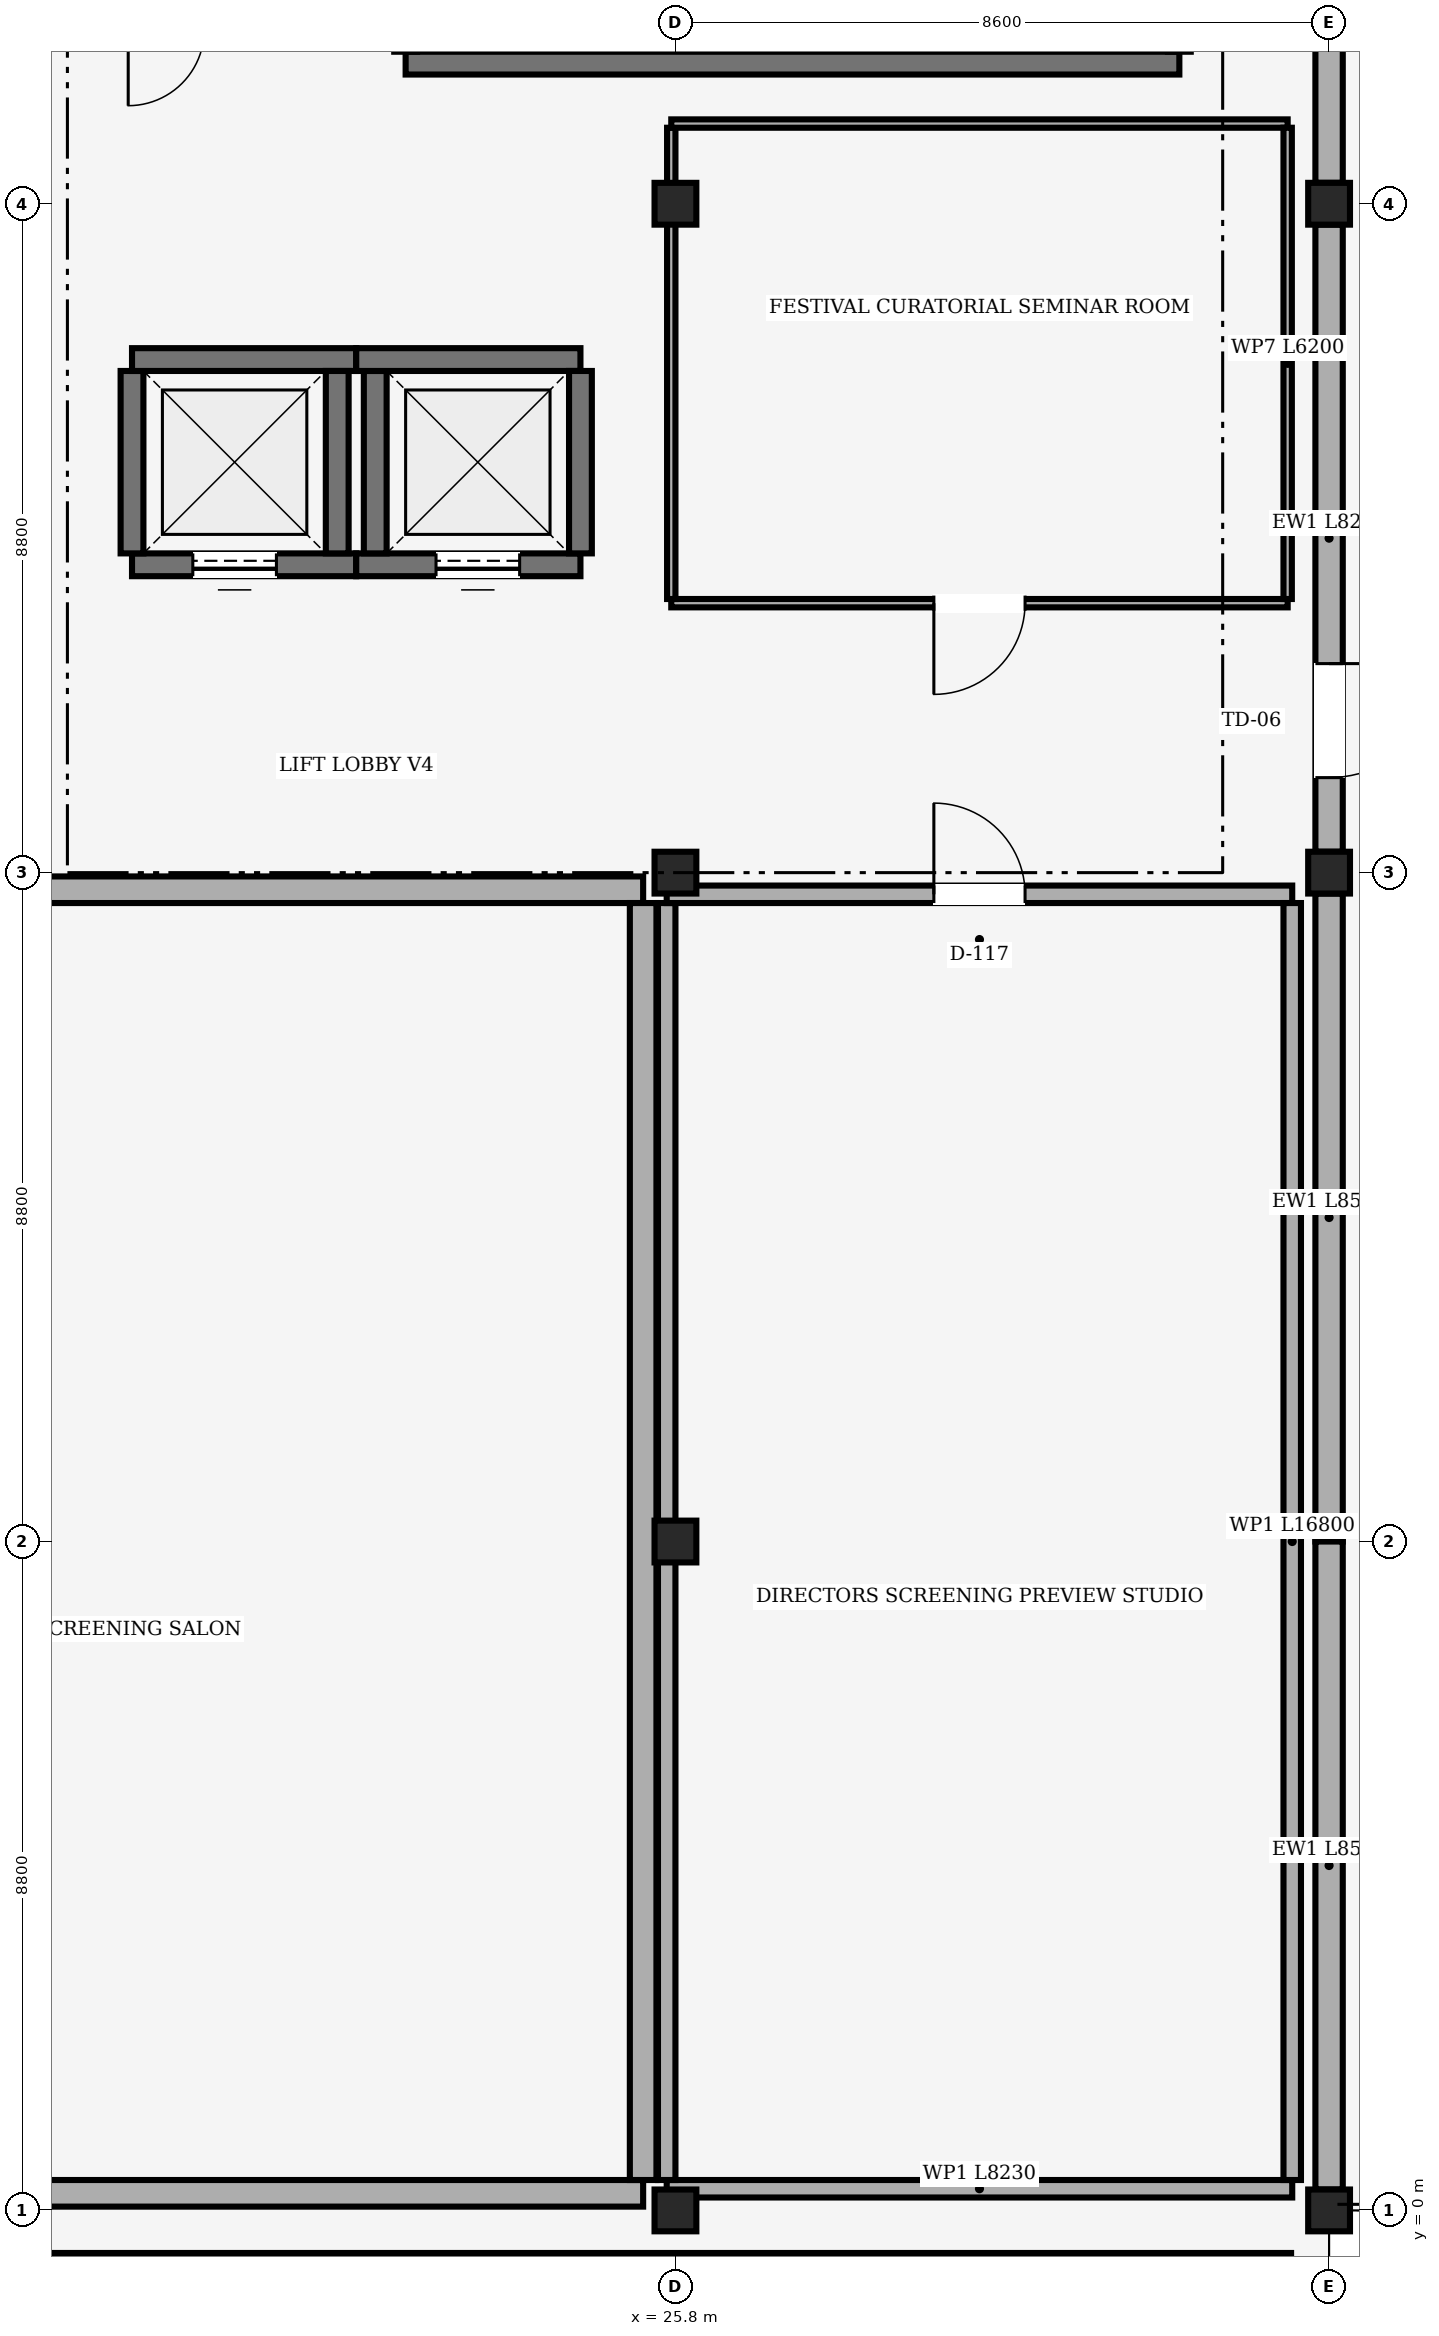
"""IFC4 building model, lengths in metres.
Left out: names, types, materials, properties, quantities, classifications, styles, units other than length and angle.
Written with IfcOpenShell. Run it as: python <this file> out.ifc"""

import sys

from ifc_helpers import new_model, si_unit, direction, frame, frame_2d, origin, origin_2d, place, context, subcontext, project, spatial, rectangle, extrude, element, fill, save


model = new_model("IFC4")
c1 = context("Model", 3, precision=1e-05, world=origin(), true_north=direction((0.0, 1.0)))
c2 = subcontext(c1, "Body", "Model", "MODEL_VIEW")
j1 = project(units=[si_unit("LENGTHUNIT", "METRE"), si_unit("PLANEANGLEUNIT", "RADIAN")], contexts=[c1])
p1 = place(None, origin())
s1 = spatial("IfcSite", under=j1, at=p1, CompositionType="ELEMENT")
p2 = place(p1, origin())
s2 = spatial("IfcBuilding", under=s1, at=p2, CompositionType="ELEMENT")
p3 = place(p2, frame((0.0, 0.0, 25.5)))
s3 = spatial("IfcBuildingStorey", under=s2, at=p3, CompositionType="ELEMENT", Elevation=25.5)
for number, where, z_axis, x_axis in (
    (1, (25.8, 0.0, 0.0), (0.0, 0.0, 1.0), (1.0, 0.0, 0.0)),
    (2, (25.8, 8.8, 0.0), (0.0, 0.0, 1.0), (1.0, 0.0, 0.0)),
    (3, (25.8, 17.6, 0.0), (0.0, 0.0, 1.0), (1.0, 0.0, 0.0)),
    (4, (25.8, 26.4, 0.0), (0.0, 0.0, 1.0), (1.0, 0.0, 0.0)),
    (5, (34.4, 0.0, 0.0), (0.0, 0.0, 1.0), (1.0, 0.0, 0.0)),
    (6, (34.4, 17.6, 0.0), (0.0, 0.0, 1.0), (1.0, 0.0, 0.0)),
    (7, (34.4, 26.4, 0.0), (0.0, 0.0, 1.0), (1.0, 0.0, 0.0)),
):
    element("IfcColumn", number, at=place(p3, frame(where, z_axis=z_axis, x_axis=x_axis)), inside=s3, PredefinedType="COLUMN", context=c2, shape_type="SweptSolid", body=[
        extrude(rectangle(XDim=0.55, YDim=0.55, at=origin_2d()), origin(), (0.0, 0.0, 1.0), 2.91),
    ])
p4 = place(p3, frame((33.9, -0.74, 0.0), z_axis=(0.0, 0.0, 1.0), x_axis=(-1.0, 0.0, 0.0)))
e8 = element("IfcWall", 8, at=p4, inside=s3, PredefinedType="SOLIDWALL", context=c2, shape_type="SweptSolid", body=[
    extrude(rectangle(XDim=34.64, YDim=0.36, at=frame_2d((17.32, 0.0))), origin(), (0.0, 0.0, 1.0), 2.91),
])
p5 = place(p4, frame((16.28, 0.0, 0.36)))
e9 = element("IfcOpeningElement", 9, at=p5, cuts=e8, PredefinedType="OPENING", context=c2, shape_type="SweptSolid", body=[
    extrude(rectangle(XDim=0.28, YDim=0.28, at=frame_2d((0.14, 0.14))), frame((0.0, 0.18, 0.0), z_axis=(0.0, -1.0, 0.0), x_axis=(1.0, 0.0, 0.0)), (0.0, 0.0, 1.0), 0.36),
])
p6 = place(p4, frame((17.18, 0.0, 0.36)))
e10 = element("IfcOpeningElement", 10, at=p6, cuts=e8, PredefinedType="OPENING", context=c2, shape_type="SweptSolid", body=[
    extrude(rectangle(XDim=0.28, YDim=0.28, at=frame_2d((0.14, 0.14))), frame((0.0, 0.18, 0.0), z_axis=(0.0, -1.0, 0.0), x_axis=(1.0, 0.0, 0.0)), (0.0, 0.0, 1.0), 0.36),
])
p7 = place(p4, frame((19.88, 0.0, 0.36)))
e11 = element("IfcOpeningElement", 11, at=p7, cuts=e8, PredefinedType="OPENING", context=c2, shape_type="SweptSolid", body=[
    extrude(rectangle(XDim=0.28, YDim=0.28, at=frame_2d((0.14, 0.14))), frame((0.0, 0.18, 0.0), z_axis=(0.0, -1.0, 0.0), x_axis=(1.0, 0.0, 0.0)), (0.0, 0.0, 1.0), 0.36),
])
p8 = place(p3, frame((34.4, 34.925, 0.0), z_axis=(0.0, 0.0, 1.0), x_axis=(0.0, -1.0, 0.0)))
e12 = element("IfcWall", 12, at=p8, inside=s3, PredefinedType="SOLIDWALL", context=c2, shape_type="SweptSolid", body=[
    extrude(rectangle(XDim=8.25, YDim=0.36, at=frame_2d((4.125, 0.0))), origin(), (0.0, 0.0, 1.0), 2.345),
])
p9 = place(p3, frame((34.4, 26.125, 0.0), z_axis=(0.0, 0.0, 1.0), x_axis=(0.0, -1.0, 0.0)))
e13 = element("IfcWall", 13, at=p9, inside=s3, PredefinedType="SOLIDWALL", context=c2, shape_type="SweptSolid", body=[
    extrude(rectangle(XDim=8.25, YDim=0.36, at=frame_2d((4.125, 0.0))), origin(), (0.0, 0.0, 1.0), 2.345),
])
p10 = place(p9, frame((5.775, 0.0, 0.0)))
e14 = element("IfcOpeningElement", 14, at=p10, cuts=e13, PredefinedType="OPENING", context=c2, shape_type="SweptSolid", body=[
    extrude(rectangle(XDim=1.5, YDim=2.15, at=frame_2d((0.75, 1.075))), frame((0.0, 0.18, 0.0), z_axis=(0.0, -1.0, 0.0), x_axis=(1.0, 0.0, 0.0)), (0.0, 0.0, 1.0), 0.36),
])
p11 = place(p3, frame((34.4, 17.325, 0.0), z_axis=(0.0, 0.0, 1.0), x_axis=(0.0, -1.0, 0.0)))
e15 = element("IfcWall", 15, at=p11, inside=s3, PredefinedType="SOLIDWALL", context=c2, shape_type="SweptSolid", body=[
    extrude(rectangle(XDim=8.525, YDim=0.36, at=frame_2d((4.262, 0.0))), origin(), (0.0, 0.0, 1.0), 2.345),
])
p12 = place(p3, frame((34.4, 8.8, 0.0), z_axis=(0.0, 0.0, 1.0), x_axis=(0.0, -1.0, 0.0)))
e16 = element("IfcWall", 16, at=p12, inside=s3, PredefinedType="SOLIDWALL", context=c2, shape_type="SweptSolid", body=[
    extrude(rectangle(XDim=8.525, YDim=0.36, at=frame_2d((4.263, 0.0))), origin(), (0.0, 0.0, 1.0), 2.345),
])
p13 = place(p3, frame((32.43, 28.25, 0.0), z_axis=(0.0, 0.0, 1.0), x_axis=(-1.0, 0.0, 0.0)))
e17 = element("IfcWall", 17, at=p13, inside=s3, PredefinedType="SHEAR", context=c2, shape_type="SweptSolid", body=[
    extrude(rectangle(XDim=10.18, YDim=0.3, at=frame_2d((5.09, 0.0))), origin(), (0.0, 0.0, 1.0), 2.91),
])
p14 = place(p3, frame((32.43, 32.55, 0.0), z_axis=(0.0, 0.0, 1.0), x_axis=(0.0, -1.0, 0.0)))
e18 = element("IfcWall", 18, at=p14, inside=s3, PredefinedType="SHEAR", context=c2, shape_type="SweptSolid", body=[
    extrude(rectangle(XDim=4.15, YDim=0.3, at=frame_2d((2.075, 0.0))), origin(), (0.0, 0.0, 1.0), 2.91),
])
p15 = place(p3, frame((21.6, 21.65, 0.0), z_axis=(0.0, 0.0, 1.0), x_axis=(-1.0, 0.0, 0.0)))
e19 = element("IfcWall", 19, at=p15, inside=s3, PredefinedType="SHEAR", context=c2, shape_type="SweptSolid", body=[
    extrude(rectangle(XDim=2.95, YDim=0.3, at=frame_2d((1.475, 0.0))), origin(), (0.0, 0.0, 1.0), 2.91),
])
p16 = place(p15, frame((1.05, 0.0, 0.0)))
e20 = element("IfcOpeningElement", 20, at=p16, cuts=e19, PredefinedType="OPENING", context=c2, shape_type="SweptSolid", body=[
    extrude(rectangle(XDim=1.1, YDim=2.1, at=frame_2d((0.55, 1.05))), frame((0.0, 0.15, 0.0), z_axis=(0.0, -1.0, 0.0), x_axis=(1.0, 0.0, 0.0)), (0.0, 0.0, 1.0), 0.3),
])
p17 = place(p3, frame((18.65, 21.8, 0.0), z_axis=(0.0, 0.0, 1.0), x_axis=(0.0, 1.0, 0.0)))
e21 = element("IfcWall", 21, at=p17, inside=s3, PredefinedType="SHEAR", context=c2, shape_type="SweptSolid", body=[
    extrude(rectangle(XDim=2.4, YDim=0.3, at=frame_2d((1.2, 0.0))), origin(), (0.0, 0.0, 1.0), 2.91),
])
p18 = place(p3, frame((18.65, 24.35, 0.0), z_axis=(0.0, 0.0, 1.0), x_axis=(1.0, 0.0, 0.0)))
e22 = element("IfcWall", 22, at=p18, inside=s3, PredefinedType="SHEAR", context=c2, shape_type="SweptSolid", body=[
    extrude(rectangle(XDim=2.95, YDim=0.3, at=frame_2d((1.475, 0.0))), origin(), (0.0, 0.0, 1.0), 2.91),
])
p19 = place(p3, frame((21.35, 24.2, 0.0), z_axis=(0.0, 0.0, 1.0), x_axis=(0.0, -1.0, 0.0)))
e23 = element("IfcWall", 23, at=p19, inside=s3, PredefinedType="SHEAR", context=c2, shape_type="SweptSolid", body=[
    extrude(rectangle(XDim=2.4, YDim=0.3, at=frame_2d((1.2, 0.0))), origin(), (0.0, 0.0, 1.0), 2.91),
])
p20 = place(p3, frame((24.55, 21.65, 0.0), z_axis=(0.0, 0.0, 1.0), x_axis=(-1.0, 0.0, 0.0)))
e24 = element("IfcWall", 24, at=p20, inside=s3, PredefinedType="SHEAR", context=c2, shape_type="SweptSolid", body=[
    extrude(rectangle(XDim=2.95, YDim=0.3, at=frame_2d((1.475, 0.0))), origin(), (0.0, 0.0, 1.0), 2.91),
])
p21 = place(p20, frame((0.8, 0.0, 0.0)))
e25 = element("IfcOpeningElement", 25, at=p21, cuts=e24, PredefinedType="OPENING", context=c2, shape_type="SweptSolid", body=[
    extrude(rectangle(XDim=1.1, YDim=2.1, at=frame_2d((0.55, 1.05))), frame((0.0, 0.15, 0.0), z_axis=(0.0, -1.0, 0.0), x_axis=(1.0, 0.0, 0.0)), (0.0, 0.0, 1.0), 0.3),
])
p22 = place(p3, frame((21.85, 21.8, 0.0), z_axis=(0.0, 0.0, 1.0), x_axis=(0.0, 1.0, 0.0)))
e26 = element("IfcWall", 26, at=p22, inside=s3, PredefinedType="SHEAR", context=c2, shape_type="SweptSolid", body=[
    extrude(rectangle(XDim=2.4, YDim=0.3, at=frame_2d((1.2, 0.0))), origin(), (0.0, 0.0, 1.0), 2.91),
])
p23 = place(p3, frame((21.6, 24.35, 0.0), z_axis=(0.0, 0.0, 1.0), x_axis=(1.0, 0.0, 0.0)))
e27 = element("IfcWall", 27, at=p23, inside=s3, PredefinedType="SHEAR", context=c2, shape_type="SweptSolid", body=[
    extrude(rectangle(XDim=2.95, YDim=0.3, at=frame_2d((1.475, 0.0))), origin(), (0.0, 0.0, 1.0), 2.91),
])
p24 = place(p3, frame((24.55, 24.2, 0.0), z_axis=(0.0, 0.0, 1.0), x_axis=(0.0, -1.0, 0.0)))
e28 = element("IfcWall", 28, at=p24, inside=s3, PredefinedType="SHEAR", context=c2, shape_type="SweptSolid", body=[
    extrude(rectangle(XDim=2.4, YDim=0.3, at=frame_2d((1.2, 0.0))), origin(), (0.0, 0.0, 1.0), 2.91),
])
p25 = place(p3, frame((25.375, 0.225, 0.0), z_axis=(0.0, 0.0, 1.0), x_axis=(-1.0, 0.0, 0.0)))
e29 = element("IfcWall", 29, at=p25, inside=s3, PredefinedType="SOLIDWALL", context=c2, shape_type="SweptSolid", body=[
    extrude(rectangle(XDim=15.95, YDim=0.35, at=frame_2d((7.975, 0.0))), origin(), (0.0, 0.0, 1.0), 2.3),
])
p26 = place(p3, frame((9.425, 17.375, 0.0), z_axis=(0.0, 0.0, 1.0), x_axis=(1.0, 0.0, 0.0)))
e30 = element("IfcWall", 30, at=p26, inside=s3, PredefinedType="SOLIDWALL", context=c2, shape_type="SweptSolid", body=[
    extrude(rectangle(XDim=15.95, YDim=0.35, at=frame_2d((7.975, 0.0))), origin(), (0.0, 0.0, 1.0), 2.34),
])
p27 = place(p26, frame((3.275, 0.0, 0.0)))
e31 = element("IfcOpeningElement", 31, at=p27, cuts=e30, PredefinedType="OPENING", context=c2, shape_type="SweptSolid", body=[
    extrude(rectangle(XDim=1.6, YDim=2.2, at=frame_2d((0.8, 1.1))), frame((0.0, 0.175, 0.0), z_axis=(0.0, -1.0, 0.0), x_axis=(1.0, 0.0, 0.0)), (0.0, 0.0, 1.0), 0.35),
])
p28 = place(p3, frame((25.375, 17.2, 0.0), z_axis=(0.0, 0.0, 1.0), x_axis=(0.0, -1.0, 0.0)))
e32 = element("IfcWall", 32, at=p28, inside=s3, PredefinedType="SOLIDWALL", context=c2, shape_type="SweptSolid", body=[
    extrude(rectangle(XDim=16.8, YDim=0.35, at=frame_2d((8.4, 0.0))), origin(), (0.0, 0.0, 1.0), 2.34),
])
p29 = place(p3, frame((33.915, 0.285, 0.0), z_axis=(0.0, 0.0, 1.0), x_axis=(-1.0, 0.0, 0.0)))
e33 = element("IfcWall", 33, at=p29, inside=s3, PredefinedType="PARTITIONING", context=c2, shape_type="SweptSolid", body=[
    extrude(rectangle(XDim=8.23, YDim=0.23, at=frame_2d((4.115, 0.0))), origin(), (0.0, 0.0, 1.0), 2.3),
])
p30 = place(p3, frame((25.685, 0.4, 0.0), z_axis=(0.0, 0.0, 1.0), x_axis=(0.0, 1.0, 0.0)))
e34 = element("IfcWall", 34, at=p30, inside=s3, PredefinedType="PARTITIONING", context=c2, shape_type="SweptSolid", body=[
    extrude(rectangle(XDim=16.8, YDim=0.23, at=frame_2d((8.4, 0.0))), origin(), (0.0, 0.0, 1.0), 2.34),
])
p31 = place(p3, frame((25.685, 17.315, 0.0), z_axis=(0.0, 0.0, 1.0), x_axis=(1.0, 0.0, 0.0)))
e35 = element("IfcWall", 35, at=p31, inside=s3, PredefinedType="PARTITIONING", context=c2, shape_type="SweptSolid", body=[
    extrude(rectangle(XDim=8.23, YDim=0.23, at=frame_2d((4.115, 0.0))), origin(), (0.0, 0.0, 1.0), 2.34),
])
p32 = place(p31, frame((3.515, 0.0, 0.0)))
e36 = element("IfcOpeningElement", 36, at=p32, cuts=e35, PredefinedType="OPENING", context=c2, shape_type="SweptSolid", body=[
    extrude(rectangle(XDim=1.2, YDim=2.15, at=frame_2d((0.6, 1.075))), frame((0.0, 0.115, 0.0), z_axis=(0.0, -1.0, 0.0), x_axis=(1.0, 0.0, 0.0)), (0.0, 0.0, 1.0), 0.23),
])
p33 = place(p3, frame((33.915, 17.2, 0.0), z_axis=(0.0, 0.0, 1.0), x_axis=(0.0, -1.0, 0.0)))
e37 = element("IfcWall", 37, at=p33, inside=s3, PredefinedType="PARTITIONING", context=c2, shape_type="SweptSolid", body=[
    extrude(rectangle(XDim=16.8, YDim=0.23, at=frame_2d((8.4, 0.0))), origin(), (0.0, 0.0, 1.0), 2.89),
])
p34 = place(p3, frame((33.855, 21.145, 0.0), z_axis=(0.0, 0.0, 1.0), x_axis=(-1.0, 0.0, 0.0)))
e38 = element("IfcWall", 38, at=p34, inside=s3, PredefinedType="PARTITIONING", context=c2, shape_type="SweptSolid", body=[
    extrude(rectangle(XDim=8.11, YDim=0.11, at=frame_2d((4.055, 0.0))), origin(), (0.0, 0.0, 1.0), 2.89),
])
p35 = place(p34, frame((3.455, 0.0, 0.0)))
e39 = element("IfcOpeningElement", 39, at=p35, cuts=e38, PredefinedType="OPENING", context=c2, shape_type="SweptSolid", body=[
    extrude(rectangle(XDim=1.2, YDim=2.15, at=frame_2d((0.6, 1.075))), frame((0.0, 0.055, 0.0), z_axis=(0.0, -1.0, 0.0), x_axis=(1.0, 0.0, 0.0)), (0.0, 0.0, 1.0), 0.11),
])
p36 = place(p3, frame((25.745, 21.2, 0.0), z_axis=(0.0, 0.0, 1.0), x_axis=(0.0, 1.0, 0.0)))
e40 = element("IfcWall", 40, at=p36, inside=s3, PredefinedType="PARTITIONING", context=c2, shape_type="SweptSolid", body=[
    extrude(rectangle(XDim=6.2, YDim=0.11, at=frame_2d((3.1, 0.0))), origin(), (0.0, 0.0, 1.0), 2.34),
])
p37 = place(p3, frame((25.745, 27.455, 0.0), z_axis=(0.0, 0.0, 1.0), x_axis=(1.0, 0.0, 0.0)))
e41 = element("IfcWall", 41, at=p37, inside=s3, PredefinedType="PARTITIONING", context=c2, shape_type="SweptSolid", body=[
    extrude(rectangle(XDim=8.11, YDim=0.11, at=frame_2d((4.055, 0.0))), origin(), (0.0, 0.0, 1.0), 2.89),
])
p38 = place(p3, frame((33.855, 27.4, 0.0), z_axis=(0.0, 0.0, 1.0), x_axis=(0.0, -1.0, 0.0)))
e42 = element("IfcWall", 42, at=p38, inside=s3, PredefinedType="PARTITIONING", context=c2, shape_type="SweptSolid", body=[
    extrude(rectangle(XDim=6.2, YDim=0.11, at=frame_2d((3.1, 0.0))), origin(), (0.0, 0.0, 1.0), 2.89),
])
p39 = place(p10, origin())
e43 = element("IfcDoor", 43, at=p39, inside=s3, OperationType="NOTDEFINED", PredefinedType="DOOR", context=c2, shape_type="SweptSolid", body=[
    extrude(rectangle(XDim=1.5, YDim=2.15, at=frame_2d((0.75, 1.075))), frame((0.0, 0.025, 0.0), z_axis=(0.0, -1.0, 0.0), x_axis=(1.0, 0.0, 0.0)), (0.0, 0.0, 1.0), 0.05),
])
fill(e14, e43)
p40 = place(p16, origin())
e44 = element("IfcDoor", 44, at=p40, inside=s3, OperationType="SLIDING_TO_LEFT", PredefinedType="DOOR", context=c2, shape_type="SweptSolid", body=[
    extrude(rectangle(XDim=1.1, YDim=2.1, at=frame_2d((0.55, 1.05))), frame((0.0, 0.025, 0.0), z_axis=(0.0, -1.0, 0.0), x_axis=(1.0, 0.0, 0.0)), (0.0, 0.0, 1.0), 0.05),
])
fill(e20, e44)
p41 = place(p21, origin())
e45 = element("IfcDoor", 45, at=p41, inside=s3, OperationType="SLIDING_TO_LEFT", PredefinedType="DOOR", context=c2, shape_type="SweptSolid", body=[
    extrude(rectangle(XDim=1.1, YDim=2.1, at=frame_2d((0.55, 1.05))), frame((0.0, 0.025, 0.0), z_axis=(0.0, -1.0, 0.0), x_axis=(1.0, 0.0, 0.0)), (0.0, 0.0, 1.0), 0.05),
])
fill(e25, e45)
p42 = place(p32, origin())
e46 = element("IfcDoor", 46, at=p42, inside=s3, OperationType="SINGLE_SWING_LEFT", PredefinedType="DOOR", context=c2, shape_type="SweptSolid", body=[
    extrude(rectangle(XDim=1.2, YDim=2.15, at=frame_2d((0.6, 1.075))), frame((0.0, 0.025, 0.0), z_axis=(0.0, -1.0, 0.0), x_axis=(1.0, 0.0, 0.0)), (0.0, 0.0, 1.0), 0.05),
])
fill(e36, e46)
p43 = place(p35, origin())
e47 = element("IfcDoor", 47, at=p43, inside=s3, OperationType="SINGLE_SWING_RIGHT", PredefinedType="DOOR", context=c2, shape_type="SweptSolid", body=[
    extrude(rectangle(XDim=1.2, YDim=2.15, at=frame_2d((0.6, 1.075))), frame((0.0, 0.025, 0.0), z_axis=(0.0, -1.0, 0.0), x_axis=(1.0, 0.0, 0.0)), (0.0, 0.0, 1.0), 0.05),
])
fill(e39, e47)
save(model, sys.argv[1])
